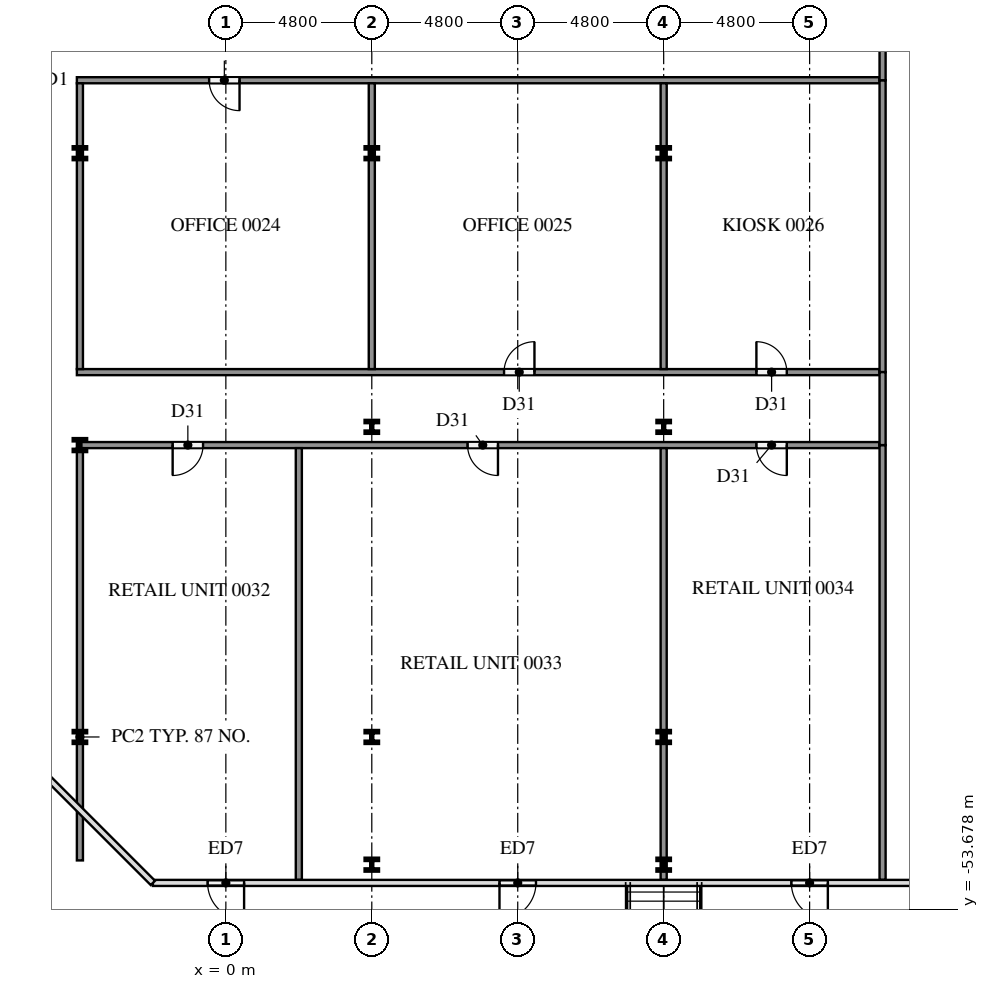
"""IFC4 building model, lengths in metres.
Left out: names, types, materials, properties, quantities, classifications, styles, units other than length and angle.
Written with IfcOpenShell. Run it as: python <this file> out.ifc"""

import sys

from ifc_helpers import new_model, si_unit, direction, frame, frame_2d, origin, origin_2d, place, context, subcontext, project, spatial, rectangle, i_section, extrude, element, fill, save


model = new_model("IFC4")
c1 = context("Model", 3, precision=1e-05, world=origin(), true_north=direction((0.0, 1.0)))
c2 = subcontext(c1, "Body", "Model", "MODEL_VIEW")
j1 = project(units=[si_unit("LENGTHUNIT", "METRE"), si_unit("PLANEANGLEUNIT", "RADIAN")], contexts=[c1])
p1 = place(None, origin())
s1 = spatial("IfcSite", under=j1, at=p1, CompositionType="ELEMENT")
p2 = place(p1, origin())
s2 = spatial("IfcBuilding", under=s1, at=p2, CompositionType="ELEMENT")
p3 = place(p2, origin())
s3 = spatial("IfcBuildingStorey", under=s2, at=p3, CompositionType="ELEMENT", Elevation=0.0)
for number, where, z_axis, x_axis in (
    (1, (-4.8, -48.0, 0.0), (0.0, 0.0, 1.0), (1.0, 0.0, 0.0)),
    (2, (-4.8, -38.4, 0.0), (0.0, 0.0, 1.0), (1.0, 0.0, 0.0)),
    (3, (-4.8, -28.8, 0.0), (0.0, 0.0, 1.0), (1.0, 0.0, 0.0)),
    (4, (4.8, -52.2, 0.0), (0.0, 0.0, 1.0), (1.0, 0.0, 0.0)),
    (5, (4.8, -48.0, 0.0), (0.0, 0.0, 1.0), (1.0, 0.0, 0.0)),
    (6, (4.8, -37.8, 0.0), (0.0, 0.0, 1.0), (1.0, 0.0, 0.0)),
    (7, (4.8, -28.8, 0.0), (0.0, 0.0, 1.0), (1.0, 0.0, 0.0)),
    (8, (14.4, -52.2, 0.0), (0.0, 0.0, 1.0), (1.0, 0.0, 0.0)),
    (9, (14.4, -48.0, 0.0), (0.0, 0.0, 1.0), (1.0, 0.0, 0.0)),
    (10, (14.4, -37.8, 0.0), (0.0, 0.0, 1.0), (1.0, 0.0, 0.0)),
    (11, (14.4, -28.8, 0.0), (0.0, 0.0, 1.0), (1.0, 0.0, 0.0)),
):
    element("IfcColumn", number, at=place(p3, frame(where, z_axis=z_axis, x_axis=x_axis)), inside=s3, PredefinedType="COLUMN", context=c2, shape_type="SweptSolid", body=[
        extrude(i_section(OverallWidth=0.396, OverallDepth=0.381, WebThickness=0.019, FlangeThickness=0.03, at=origin_2d()), origin(), (0.0, 0.0, 1.0), 5.7),
    ])
p4 = place(p3, frame((1.2, -52.8, 0.0), z_axis=(0.0, 0.0, 1.0), x_axis=(-1.0, 0.0, 0.0)))
e12 = element("IfcWall", 12, at=p4, inside=s3, PredefinedType="SOLIDWALL", context=c2, shape_type="SweptSolid", body=[
    extrude(rectangle(XDim=2.4, YDim=0.15, at=frame_2d((1.2, 0.0))), origin(), (0.0, 0.0, 1.0), 5.7),
])
p5 = place(p4, frame((0.6, 0.0, 0.0)))
e13 = element("IfcOpeningElement", 13, at=p5, cuts=e12, PredefinedType="OPENING", context=c2, shape_type="SweptSolid", body=[
    extrude(rectangle(XDim=1.2, YDim=2.4, at=frame_2d((0.6, 1.2))), frame((0.0, 0.085, 0.0), z_axis=(0.0, -1.0, 0.0), x_axis=(1.0, 0.0, 0.0)), (0.0, 0.0, 1.0), 0.17),
])
p6 = place(p3, frame((10.8, -52.8, 0.0), z_axis=(0.0, 0.0, 1.0), x_axis=(-1.0, 0.0, 0.0)))
e14 = element("IfcWall", 14, at=p6, inside=s3, PredefinedType="SOLIDWALL", context=c2, shape_type="SweptSolid", body=[
    extrude(rectangle(XDim=2.4, YDim=0.15, at=frame_2d((1.2, 0.0))), origin(), (0.0, 0.0, 1.0), 5.7),
])
p7 = place(p6, frame((0.6, 0.0, 0.0)))
e15 = element("IfcOpeningElement", 15, at=p7, cuts=e14, PredefinedType="OPENING", context=c2, shape_type="SweptSolid", body=[
    extrude(rectangle(XDim=1.2, YDim=2.4, at=frame_2d((0.6, 1.2))), frame((0.0, 0.085, 0.0), z_axis=(0.0, -1.0, 0.0), x_axis=(1.0, 0.0, 0.0)), (0.0, 0.0, 1.0), 0.17),
])
p8 = place(p3, frame((20.4, -52.8, 0.0), z_axis=(0.0, 0.0, 1.0), x_axis=(-1.0, 0.0, 0.0)))
e16 = element("IfcWall", 16, at=p8, inside=s3, PredefinedType="SOLIDWALL", context=c2, shape_type="SweptSolid", body=[
    extrude(rectangle(XDim=2.4, YDim=0.15, at=frame_2d((1.2, 0.0))), origin(), (0.0, 0.0, 1.0), 5.7),
])
p9 = place(p8, frame((0.6, 0.0, 0.0)))
e17 = element("IfcOpeningElement", 17, at=p9, cuts=e16, PredefinedType="OPENING", context=c2, shape_type="SweptSolid", body=[
    extrude(rectangle(XDim=1.2, YDim=2.4, at=frame_2d((0.6, 1.2))), frame((0.0, 0.085, 0.0), z_axis=(0.0, -1.0, 0.0), x_axis=(1.0, 0.0, 0.0)), (0.0, 0.0, 1.0), 0.17),
])
p10 = place(p3, frame((21.6, -52.8, 0.0), z_axis=(0.0, 0.0, 1.0), x_axis=(1.0, 0.0, 0.0)))
e18 = element("IfcWall", 18, at=p10, inside=s3, PredefinedType="SOLIDWALL", context=c2, shape_type="SweptSolid", body=[
    extrude(rectangle(XDim=4.8, YDim=0.15, at=frame_2d((2.4, 0.0))), origin(), (0.0, 0.0, 1.0), 5.7),
])
p11 = place(p10, frame((1.2, 0.0, 0.0)))
e19 = element("IfcOpeningElement", 19, at=p11, cuts=e18, PredefinedType="OPENING", context=c2, shape_type="SweptSolid", body=[
    extrude(rectangle(XDim=2.4, YDim=2.7, at=frame_2d((1.2, 1.35))), frame((0.0, 0.085, 0.0), z_axis=(0.0, -1.0, 0.0), x_axis=(1.0, 0.0, 0.0)), (0.0, 0.0, 1.0), 0.17),
])
p12 = place(p3, frame((21.5, -38.4, 0.0), z_axis=(0.0, 0.0, 1.0), x_axis=(-1.0, 0.0, 0.0)))
e20 = element("IfcWall", 20, at=p12, inside=s3, PredefinedType="PARTITIONING", context=c2, shape_type="SweptSolid", body=[
    extrude(rectangle(XDim=26.4, YDim=0.2, at=frame_2d((13.2, 0.0))), origin(), (0.0, 0.0, 1.0), 5.7),
])
p13 = place(p12, frame((22.25, 0.0, 0.0)))
e21 = element("IfcOpeningElement", 21, at=p13, cuts=e20, PredefinedType="OPENING", context=c2, shape_type="SweptSolid", body=[
    extrude(rectangle(XDim=1.0, YDim=2.1, at=frame_2d((0.5, 1.05))), frame((0.0, 0.11, 0.0), z_axis=(0.0, -1.0, 0.0), x_axis=(1.0, 0.0, 0.0)), (0.0, 0.0, 1.0), 0.22),
])
p14 = place(p12, frame((12.55, 0.0, 0.0)))
e22 = element("IfcOpeningElement", 22, at=p14, cuts=e20, PredefinedType="OPENING", context=c2, shape_type="SweptSolid", body=[
    extrude(rectangle(XDim=1.0, YDim=2.1, at=frame_2d((0.5, 1.05))), frame((0.0, 0.11, 0.0), z_axis=(0.0, -1.0, 0.0), x_axis=(1.0, 0.0, 0.0)), (0.0, 0.0, 1.0), 0.22),
])
p15 = place(p12, frame((3.05, 0.0, 0.0)))
e23 = element("IfcOpeningElement", 23, at=p15, cuts=e20, PredefinedType="OPENING", context=c2, shape_type="SweptSolid", body=[
    extrude(rectangle(XDim=1.0, YDim=2.1, at=frame_2d((0.5, 1.05))), frame((0.0, 0.11, 0.0), z_axis=(0.0, -1.0, 0.0), x_axis=(1.0, 0.0, 0.0)), (0.0, 0.0, 1.0), 0.22),
])
p16 = place(p3, frame((-4.9, -36.0, 0.0), z_axis=(0.0, 0.0, 1.0), x_axis=(1.0, 0.0, 0.0)))
e24 = element("IfcWall", 24, at=p16, inside=s3, PredefinedType="PARTITIONING", context=c2, shape_type="SweptSolid", body=[
    extrude(rectangle(XDim=26.4, YDim=0.2, at=frame_2d((13.2, 0.0))), origin(), (0.0, 0.0, 1.0), 5.7),
])
p17 = place(p16, frame((14.05, 0.0, 0.0)))
e25 = element("IfcOpeningElement", 25, at=p17, cuts=e24, PredefinedType="OPENING", context=c2, shape_type="SweptSolid", body=[
    extrude(rectangle(XDim=1.0, YDim=2.1, at=frame_2d((0.5, 1.05))), frame((0.0, 0.11, 0.0), z_axis=(0.0, -1.0, 0.0), x_axis=(1.0, 0.0, 0.0)), (0.0, 0.0, 1.0), 0.22),
])
p18 = place(p16, frame((22.35, 0.0, 0.0)))
e26 = element("IfcOpeningElement", 26, at=p18, cuts=e24, PredefinedType="OPENING", context=c2, shape_type="SweptSolid", body=[
    extrude(rectangle(XDim=1.0, YDim=2.1, at=frame_2d((0.5, 1.05))), frame((0.0, 0.11, 0.0), z_axis=(0.0, -1.0, 0.0), x_axis=(1.0, 0.0, 0.0)), (0.0, 0.0, 1.0), 0.22),
])
p19 = place(p3, frame((21.5, -26.4, 0.0), z_axis=(0.0, 0.0, 1.0), x_axis=(-1.0, 0.0, 0.0)))
e27 = element("IfcWall", 27, at=p19, inside=s3, PredefinedType="PARTITIONING", context=c2, shape_type="SweptSolid", body=[
    extrude(rectangle(XDim=26.4, YDim=0.2, at=frame_2d((13.2, 0.0))), origin(), (0.0, 0.0, 1.0), 5.7),
])
p20 = place(p19, frame((21.05, 0.0, 0.0)))
e28 = element("IfcOpeningElement", 28, at=p20, cuts=e27, PredefinedType="OPENING", context=c2, shape_type="SweptSolid", body=[
    extrude(rectangle(XDim=1.0, YDim=2.1, at=frame_2d((0.5, 1.05))), frame((0.0, 0.11, 0.0), z_axis=(0.0, -1.0, 0.0), x_axis=(1.0, 0.0, 0.0)), (0.0, 0.0, 1.0), 0.22),
])
p21 = place(p3, frame((-4.8, -52.06, 0.0), z_axis=(0.0, 0.0, 1.0), x_axis=(0.0, 1.0, 0.0)))
e29 = element("IfcWall", 29, at=p21, inside=s3, PredefinedType="PARTITIONING", context=c2, shape_type="SweptSolid", body=[
    extrude(rectangle(XDim=13.56, YDim=0.2, at=frame_2d((6.78, 0.0))), origin(), (0.0, 0.0, 1.0), 5.7),
])
p22 = place(p3, frame((-4.8, -35.9, 0.0), z_axis=(0.0, 0.0, 1.0), x_axis=(0.0, 1.0, 0.0)))
e30 = element("IfcWall", 30, at=p22, inside=s3, PredefinedType="PARTITIONING", context=c2, shape_type="SweptSolid", body=[
    extrude(rectangle(XDim=9.4, YDim=0.2, at=frame_2d((4.7, 0.0))), origin(), (0.0, 0.0, 1.0), 5.7),
])
p23 = place(p3, frame((2.4, -52.7, 0.0), z_axis=(0.0, 0.0, 1.0), x_axis=(0.0, 1.0, 0.0)))
e31 = element("IfcWall", 31, at=p23, inside=s3, PredefinedType="PARTITIONING", context=c2, shape_type="SweptSolid", body=[
    extrude(rectangle(XDim=14.2, YDim=0.2, at=frame_2d((7.1, 0.0))), origin(), (0.0, 0.0, 1.0), 5.7),
])
p24 = place(p3, frame((4.8, -35.9, 0.0), z_axis=(0.0, 0.0, 1.0), x_axis=(0.0, 1.0, 0.0)))
e32 = element("IfcWall", 32, at=p24, inside=s3, PredefinedType="PARTITIONING", context=c2, shape_type="SweptSolid", body=[
    extrude(rectangle(XDim=9.4, YDim=0.2, at=frame_2d((4.7, 0.0))), origin(), (0.0, 0.0, 1.0), 5.7),
])
p25 = place(p3, frame((14.4, -52.7, 0.0), z_axis=(0.0, 0.0, 1.0), x_axis=(0.0, 1.0, 0.0)))
e33 = element("IfcWall", 33, at=p25, inside=s3, PredefinedType="PARTITIONING", context=c2, shape_type="SweptSolid", body=[
    extrude(rectangle(XDim=14.2, YDim=0.2, at=frame_2d((7.1, 0.0))), origin(), (0.0, 0.0, 1.0), 5.7),
])
p26 = place(p3, frame((14.4, -35.9, 0.0), z_axis=(0.0, 0.0, 1.0), x_axis=(0.0, 1.0, 0.0)))
e34 = element("IfcWall", 34, at=p26, inside=s3, PredefinedType="PARTITIONING", context=c2, shape_type="SweptSolid", body=[
    extrude(rectangle(XDim=9.4, YDim=0.2, at=frame_2d((4.7, 0.0))), origin(), (0.0, 0.0, 1.0), 5.7),
])
p27 = place(p3, frame((21.6, -52.7, 0.0), z_axis=(0.0, 0.0, 1.0), x_axis=(0.0, 1.0, 0.0)))
e35 = element("IfcWall", 35, at=p27, inside=s3, PredefinedType="PARTITIONING", context=c2, shape_type="SweptSolid", body=[
    extrude(rectangle(XDim=14.3, YDim=0.2, at=frame_2d((7.15, 0.0))), origin(), (0.0, 0.0, 1.0), 5.7),
])
p28 = place(p3, frame((21.6, -36.0, 0.0), z_axis=(0.0, 0.0, 1.0), x_axis=(0.0, 1.0, 0.0)))
e36 = element("IfcWall", 36, at=p28, inside=s3, PredefinedType="PARTITIONING", context=c2, shape_type="SweptSolid", body=[
    extrude(rectangle(XDim=9.6, YDim=0.2, at=frame_2d((4.8, 0.0))), origin(), (0.0, 0.0, 1.0), 5.7),
])
p29 = place(p3, frame((21.6, -38.4, 0.0), z_axis=(0.0, 0.0, 1.0), x_axis=(0.0, 1.0, 0.0)))
e37 = element("IfcWall", 37, at=p29, inside=s3, PredefinedType="PARTITIONING", context=c2, shape_type="SweptSolid", body=[
    extrude(rectangle(XDim=2.4, YDim=0.2, at=frame_2d((1.2, 0.0))), origin(), (0.0, 0.0, 1.0), 5.7),
])
p30 = place(p3, frame((21.6, -26.4, 0.0), z_axis=(0.0, 0.0, 1.0), x_axis=(0.0, 1.0, 0.0)))
e38 = element("IfcWall", 38, at=p30, inside=s3, PredefinedType="PARTITIONING", context=c2, shape_type="SweptSolid", body=[
    extrude(rectangle(XDim=3.0, YDim=0.2, at=frame_2d((1.5, 0.0))), origin(), (0.0, 0.0, 1.0), 5.7),
])
p31 = place(p5, origin())
e39 = element("IfcDoor", 39, at=p31, inside=s3, OperationType="SINGLE_SWING_LEFT", PredefinedType="DOOR", context=c2, shape_type="SweptSolid", body=[
    extrude(rectangle(XDim=1.2, YDim=2.4, at=frame_2d((0.6, 1.2))), frame((0.0, 0.025, 0.0), z_axis=(0.0, -1.0, 0.0), x_axis=(1.0, 0.0, 0.0)), (0.0, 0.0, 1.0), 0.05),
])
fill(e13, e39)
p32 = place(p7, origin())
e40 = element("IfcDoor", 40, at=p32, inside=s3, OperationType="SINGLE_SWING_RIGHT", PredefinedType="DOOR", context=c2, shape_type="SweptSolid", body=[
    extrude(rectangle(XDim=1.2, YDim=2.4, at=frame_2d((0.6, 1.2))), frame((0.0, 0.025, 0.0), z_axis=(0.0, -1.0, 0.0), x_axis=(1.0, 0.0, 0.0)), (0.0, 0.0, 1.0), 0.05),
])
fill(e15, e40)
p33 = place(p9, origin())
e41 = element("IfcDoor", 41, at=p33, inside=s3, OperationType="SINGLE_SWING_LEFT", PredefinedType="DOOR", context=c2, shape_type="SweptSolid", body=[
    extrude(rectangle(XDim=1.2, YDim=2.4, at=frame_2d((0.6, 1.2))), frame((0.0, 0.025, 0.0), z_axis=(0.0, -1.0, 0.0), x_axis=(1.0, 0.0, 0.0)), (0.0, 0.0, 1.0), 0.05),
])
fill(e17, e41)
p34 = place(p20, origin())
e42 = element("IfcDoor", 42, at=p34, inside=s3, OperationType="SINGLE_SWING_LEFT", PredefinedType="DOOR", context=c2, shape_type="SweptSolid", body=[
    extrude(rectangle(XDim=1.0, YDim=2.1, at=frame_2d((0.5, 1.05))), frame((0.0, 0.025, 0.0), z_axis=(0.0, -1.0, 0.0), x_axis=(1.0, 0.0, 0.0)), (0.0, 0.0, 1.0), 0.05),
])
fill(e28, e42)
p35 = place(p17, origin())
e43 = element("IfcDoor", 43, at=p35, inside=s3, OperationType="SINGLE_SWING_RIGHT", PredefinedType="DOOR", context=c2, shape_type="SweptSolid", body=[
    extrude(rectangle(XDim=1.0, YDim=2.1, at=frame_2d((0.5, 1.05))), frame((0.0, 0.025, 0.0), z_axis=(0.0, -1.0, 0.0), x_axis=(1.0, 0.0, 0.0)), (0.0, 0.0, 1.0), 0.05),
])
fill(e25, e43)
p36 = place(p18, origin())
e44 = element("IfcDoor", 44, at=p36, inside=s3, OperationType="SINGLE_SWING_LEFT", PredefinedType="DOOR", context=c2, shape_type="SweptSolid", body=[
    extrude(rectangle(XDim=1.0, YDim=2.1, at=frame_2d((0.5, 1.05))), frame((0.0, 0.025, 0.0), z_axis=(0.0, -1.0, 0.0), x_axis=(1.0, 0.0, 0.0)), (0.0, 0.0, 1.0), 0.05),
])
fill(e26, e44)
p37 = place(p13, origin())
e45 = element("IfcDoor", 45, at=p37, inside=s3, OperationType="SINGLE_SWING_RIGHT", PredefinedType="DOOR", context=c2, shape_type="SweptSolid", body=[
    extrude(rectangle(XDim=1.0, YDim=2.1, at=frame_2d((0.5, 1.05))), frame((0.0, 0.025, 0.0), z_axis=(0.0, -1.0, 0.0), x_axis=(1.0, 0.0, 0.0)), (0.0, 0.0, 1.0), 0.05),
])
fill(e21, e45)
p38 = place(p14, origin())
e46 = element("IfcDoor", 46, at=p38, inside=s3, OperationType="SINGLE_SWING_LEFT", PredefinedType="DOOR", context=c2, shape_type="SweptSolid", body=[
    extrude(rectangle(XDim=1.0, YDim=2.1, at=frame_2d((0.5, 1.05))), frame((0.0, 0.025, 0.0), z_axis=(0.0, -1.0, 0.0), x_axis=(1.0, 0.0, 0.0)), (0.0, 0.0, 1.0), 0.05),
])
fill(e22, e46)
p39 = place(p15, origin())
e47 = element("IfcDoor", 47, at=p39, inside=s3, OperationType="SINGLE_SWING_LEFT", PredefinedType="DOOR", context=c2, shape_type="SweptSolid", body=[
    extrude(rectangle(XDim=1.0, YDim=2.1, at=frame_2d((0.5, 1.05))), frame((0.0, 0.025, 0.0), z_axis=(0.0, -1.0, 0.0), x_axis=(1.0, 0.0, 0.0)), (0.0, 0.0, 1.0), 0.05),
])
fill(e23, e47)
save(model, sys.argv[1])
